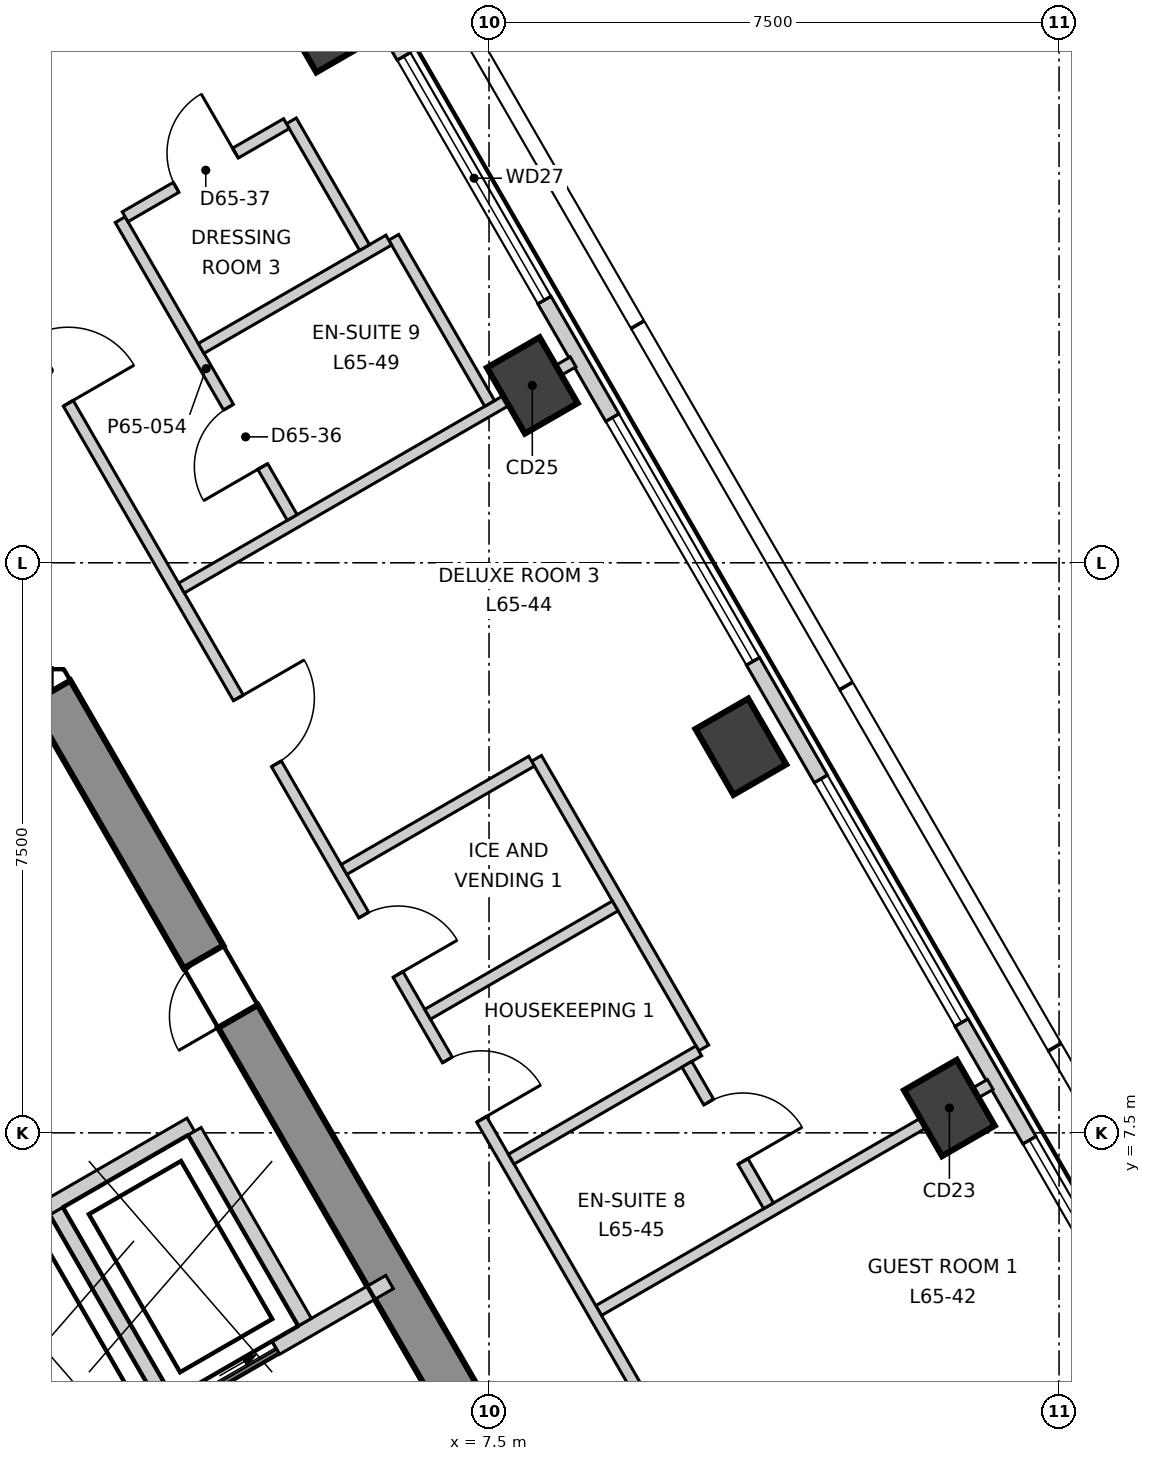
"""IFC4 building model, lengths in metres.
Left out: names, types, materials, properties, quantities, classifications, styles, units other than length and angle.
Written with IfcOpenShell. Run it as: python <this file> out.ifc"""

import sys

from ifc_helpers import new_model, si_unit, direction, frame, frame_2d, origin, origin_2d, place, context, subcontext, project, spatial, polyline, rectangle, outline, extrude, element, fill, save


model = new_model("IFC4")
c1 = context("Model", 3, precision=1e-05, world=origin(), true_north=direction((0.0, 1.0)))
c2 = subcontext(c1, "Body", "Model", "MODEL_VIEW")
j1 = project(units=[si_unit("LENGTHUNIT", "METRE"), si_unit("PLANEANGLEUNIT", "RADIAN")], contexts=[c1])
p1 = place(None, origin())
s1 = spatial("IfcSite", under=j1, at=p1, CompositionType="ELEMENT")
p2 = place(p1, origin())
s2 = spatial("IfcBuilding", under=s1, at=p2, CompositionType="ELEMENT")
p3 = place(p2, frame((0.0, 0.0, 279.1)))
s3 = spatial("IfcBuildingStorey", under=s2, at=p3, CompositionType="ELEMENT", Elevation=279.1)
p4 = place(p3, frame((1.732, 13.3, -0.3), z_axis=(0.0, 0.0, 1.0), x_axis=(-1.0, 0.0, 0.0)))
e1 = element("IfcWall", 1, at=p4, inside=s3, PredefinedType="SHEAR", context=c2, shape_type="SweptSolid", body=[
    extrude(outline(polyline([(-0.173, -0.3), (1.732, -0.3), (3.637, -0.3), (3.291, 0.3), (1.732, 0.3), (0.173, 0.3), (-0.173, -0.3)])), origin(), (0.0, 0.0, 1.0), 3.6),
])
p5 = place(p4, frame((1.032, 0.0, 0.3)))
e2 = element("IfcOpeningElement", 2, at=p5, cuts=e1, PredefinedType="OPENING", context=c2, shape_type="SweptSolid", body=[
    extrude(rectangle(XDim=1.4, YDim=2.1, at=frame_2d((0.7, 1.05))), frame((0.0, 0.31, 0.0), z_axis=(0.0, -1.0, 0.0), x_axis=(1.0, 0.0, 0.0)), (0.0, 0.0, 1.0), 0.62),
])
p6 = place(p3, frame((12.384, -5.15, -0.3), z_axis=(0.0, 0.0, 1.0), x_axis=(-0.500000539815, 0.866025092122, 0.0)))
e3 = element("IfcWall", 3, at=p6, inside=s3, PredefinedType="SHEAR", context=c2, shape_type="SweptSolid", body=[
    extrude(outline(polyline([(-0.173, -0.301), (1.795, -0.301), (3.763, -0.301), (5.731, -0.301), (7.7, -0.301), (9.668, -0.301), (11.636, -0.301), (13.604, -0.3), (15.573, -0.3), (17.541, -0.3), (19.509, -0.3), (21.477, -0.3), (21.131, 0.3), (19.226, 0.3), (17.321, 0.3), (15.415, 0.3), (13.51, 0.3), (11.605, 0.3), (9.699, 0.3), (7.794, 0.3), (5.889, 0.3), (3.984, 0.3), (2.078, 0.3), (0.173, 0.3), (-0.173, -0.301)])), origin(), (0.0, 0.0, 1.0), 3.6),
])
p7 = place(p6, frame((16.378, 0.0, 0.3)))
e4 = element("IfcOpeningElement", 4, at=p7, cuts=e3, PredefinedType="OPENING", context=c2, shape_type="SweptSolid", body=[
    extrude(rectangle(XDim=0.9, YDim=2.1, at=frame_2d((0.45, 1.05))), frame((0.0, 0.31, 0.0), z_axis=(0.0, -1.0, 0.0), x_axis=(1.0, 0.0, 0.0)), (0.0, 0.0, 1.0), 0.621),
])
p8 = place(p6, frame((3.976, 0.0, 0.3)))
e5 = element("IfcOpeningElement", 5, at=p8, cuts=e3, PredefinedType="OPENING", context=c2, shape_type="SweptSolid", body=[
    extrude(rectangle(XDim=1.0, YDim=2.1, at=frame_2d((0.5, 1.05))), frame((0.0, 0.31, 0.0), z_axis=(0.0, -1.0, 0.0), x_axis=(1.0, 0.0, 0.0)), (0.0, 0.0, 1.0), 0.621),
])
for number, where, z_axis, x_axis in (
    (6, (13.557, 7.827, -0.3), (0.0, 0.0, 1.0), (-0.5, 0.866, 0.0)),
    (7, (10.813, 12.58, -0.3), (0.0, 0.0, 1.0), (-0.5, 0.866, 0.0)),
    (8, (8.069, 17.333, -0.3), (0.0, 0.0, 1.0), (-0.5, 0.866, 0.0)),
    (9, (5.325, 22.085, -0.3), (0.0, 0.0, 1.0), (-0.5, 0.866, 0.0)),
):
    element("IfcColumn", number, at=place(p3, frame(where, z_axis=z_axis, x_axis=x_axis)), inside=s3, PredefinedType="COLUMN", context=c2, shape_type="SweptSolid", body=[
        extrude(rectangle(XDim=1.0, YDim=0.8, at=origin_2d()), origin(), (0.0, 0.0, 1.0), 3.6),
    ])
p9 = place(p3, frame((25.791, -11.962, 0.0), z_axis=(0.0, 0.0, 1.0), x_axis=(-0.500006870765, 0.86602143691, 0.0)))
e10 = element("IfcWall", 10, at=p9, inside=s3, PredefinedType="ELEMENTEDWALL", context=c2, shape_type="SweptSolid", body=[
    extrude(rectangle(XDim=46.49, YDim=0.2, at=frame_2d((23.245, 0.0))), origin(), (0.0, 0.0, 1.0), 3.3),
])
p10 = place(p9, frame((2.197, 0.0, 0.9)))
e11 = element("IfcOpeningElement", 11, at=p10, cuts=e10, PredefinedType="OPENING", context=c2, shape_type="SweptSolid", body=[
    extrude(rectangle(XDim=3.7, YDim=2.2, at=frame_2d((1.85, 1.1))), frame((0.0, 0.11, 0.0), z_axis=(0.0, -1.0, 0.0), x_axis=(1.0, 0.0, 0.0)), (0.0, 0.0, 1.0), 0.22),
])
p11 = place(p9, frame((7.685, 0.0, 0.9)))
e12 = element("IfcOpeningElement", 12, at=p11, cuts=e10, PredefinedType="OPENING", context=c2, shape_type="SweptSolid", body=[
    extrude(rectangle(XDim=3.7, YDim=2.2, at=frame_2d((1.85, 1.1))), frame((0.0, 0.11, 0.0), z_axis=(0.0, -1.0, 0.0), x_axis=(1.0, 0.0, 0.0)), (0.0, 0.0, 1.0), 0.22),
])
p12 = place(p9, frame((13.173, 0.0, 0.9)))
e13 = element("IfcOpeningElement", 13, at=p12, cuts=e10, PredefinedType="OPENING", context=c2, shape_type="SweptSolid", body=[
    extrude(rectangle(XDim=3.7, YDim=2.2, at=frame_2d((1.85, 1.1))), frame((0.0, 0.11, 0.0), z_axis=(0.0, -1.0, 0.0), x_axis=(1.0, 0.0, 0.0)), (0.0, 0.0, 1.0), 0.22),
])
p13 = place(p9, frame((18.661, 0.0, 0.9)))
e14 = element("IfcOpeningElement", 14, at=p13, cuts=e10, PredefinedType="OPENING", context=c2, shape_type="SweptSolid", body=[
    extrude(rectangle(XDim=3.7, YDim=2.2, at=frame_2d((1.85, 1.1))), frame((0.0, 0.11, 0.0), z_axis=(0.0, -1.0, 0.0), x_axis=(1.0, 0.0, 0.0)), (0.0, 0.0, 1.0), 0.22),
])
p14 = place(p9, frame((24.149, 0.0, 0.9)))
e15 = element("IfcOpeningElement", 15, at=p14, cuts=e10, PredefinedType="OPENING", context=c2, shape_type="SweptSolid", body=[
    extrude(rectangle(XDim=3.7, YDim=2.2, at=frame_2d((1.85, 1.1))), frame((0.0, 0.11, 0.0), z_axis=(0.0, -1.0, 0.0), x_axis=(1.0, 0.0, 0.0)), (0.0, 0.0, 1.0), 0.22),
])
p15 = place(p9, frame((29.637, 0.0, 0.9)))
e16 = element("IfcOpeningElement", 16, at=p15, cuts=e10, PredefinedType="OPENING", context=c2, shape_type="SweptSolid", body=[
    extrude(rectangle(XDim=3.7, YDim=2.2, at=frame_2d((1.85, 1.1))), frame((0.0, 0.11, 0.0), z_axis=(0.0, -1.0, 0.0), x_axis=(1.0, 0.0, 0.0)), (0.0, 0.0, 1.0), 0.22),
])
p16 = place(p9, frame((35.125, 0.0, 0.9)))
e17 = element("IfcOpeningElement", 17, at=p16, cuts=e10, PredefinedType="OPENING", context=c2, shape_type="SweptSolid", body=[
    extrude(rectangle(XDim=3.7, YDim=2.2, at=frame_2d((1.85, 1.1))), frame((0.0, 0.11, 0.0), z_axis=(0.0, -1.0, 0.0), x_axis=(1.0, 0.0, 0.0)), (0.0, 0.0, 1.0), 0.22),
])
p17 = place(p9, frame((40.613, 0.0, 0.9)))
e18 = element("IfcOpeningElement", 18, at=p17, cuts=e10, PredefinedType="OPENING", context=c2, shape_type="SweptSolid", body=[
    extrude(rectangle(XDim=3.7, YDim=2.2, at=frame_2d((1.85, 1.1))), frame((0.0, 0.11, 0.0), z_axis=(0.0, -1.0, 0.0), x_axis=(1.0, 0.0, 0.0)), (0.0, 0.0, 1.0), 0.22),
])
p18 = place(p3, frame((8.942, 5.162, 0.0), z_axis=(0.0, 0.0, 1.0), x_axis=(0.866004483474, 0.50003623329, 0.0)))
e19 = element("IfcWall", 19, at=p18, inside=s3, PredefinedType="PARTITIONING", context=c2, shape_type="SweptSolid", body=[
    extrude(rectangle(XDim=5.949, YDim=0.15, at=frame_2d((2.975, 0.0))), origin(), (0.0, 0.0, 1.0), 2.8),
])
p19 = place(p3, frame((0.075, 20.37, 0.0), z_axis=(0.0, 0.0, 1.0), x_axis=(0.500003985697, -0.866023102629, 0.0)))
e20 = element("IfcWall", 20, at=p19, inside=s3, PredefinedType="PARTITIONING", context=c2, shape_type="SweptSolid", body=[
    extrude(rectangle(XDim=35.206, YDim=0.15, at=frame_2d((17.603, 0.0))), origin(), (0.0, 0.0, 1.0), 3.3),
])
p20 = place(p19, frame((31.506, 0.0, 0.0)))
e21 = element("IfcOpeningElement", 21, at=p20, cuts=e20, PredefinedType="OPENING", context=c2, shape_type="SweptSolid", body=[
    extrude(rectangle(XDim=1.0, YDim=2.1, at=frame_2d((0.5, 1.05))), frame((0.0, 0.085, 0.0), z_axis=(0.0, -1.0, 0.0), x_axis=(1.0, 0.0, 0.0)), (0.0, 0.0, 1.0), 0.17),
])
p21 = place(p19, frame((26.529, 0.0, 0.0)))
e22 = element("IfcOpeningElement", 22, at=p21, cuts=e20, PredefinedType="OPENING", context=c2, shape_type="SweptSolid", body=[
    extrude(rectangle(XDim=1.0, YDim=2.1, at=frame_2d((0.5, 1.05))), frame((0.0, 0.085, 0.0), z_axis=(0.0, -1.0, 0.0), x_axis=(1.0, 0.0, 0.0)), (0.0, 0.0, 1.0), 0.17),
])
p22 = place(p19, frame((19.442, 0.0, 0.0)))
e23 = element("IfcOpeningElement", 23, at=p22, cuts=e20, PredefinedType="OPENING", context=c2, shape_type="SweptSolid", body=[
    extrude(rectangle(XDim=1.0, YDim=2.1, at=frame_2d((0.5, 1.05))), frame((0.0, 0.085, 0.0), z_axis=(0.0, -1.0, 0.0), x_axis=(1.0, 0.0, 0.0)), (0.0, 0.0, 1.0), 0.17),
])
p23 = place(p19, frame((8.254, 0.0, 0.0)))
e24 = element("IfcOpeningElement", 24, at=p23, cuts=e20, PredefinedType="OPENING", context=c2, shape_type="SweptSolid", body=[
    extrude(rectangle(XDim=1.0, YDim=2.1, at=frame_2d((0.5, 1.05))), frame((0.0, 0.085, 0.0), z_axis=(0.0, -1.0, 0.0), x_axis=(1.0, 0.0, 0.0)), (0.0, 0.0, 1.0), 0.17),
])
p24 = place(p19, frame((13.754, 0.0, 0.0)))
e25 = element("IfcOpeningElement", 25, at=p24, cuts=e20, PredefinedType="OPENING", context=c2, shape_type="SweptSolid", body=[
    extrude(rectangle(XDim=0.9, YDim=2.1, at=frame_2d((0.45, 1.05))), frame((0.0, 0.085, 0.0), z_axis=(0.0, -1.0, 0.0), x_axis=(1.0, 0.0, 0.0)), (0.0, 0.0, 1.0), 0.17),
])
p25 = place(p19, frame((11.554, 0.0, 0.0)))
e26 = element("IfcOpeningElement", 26, at=p25, cuts=e20, PredefinedType="OPENING", context=c2, shape_type="SweptSolid", body=[
    extrude(rectangle(XDim=0.9, YDim=2.1, at=frame_2d((0.45, 1.05))), frame((0.0, 0.085, 0.0), z_axis=(0.0, -1.0, 0.0), x_axis=(1.0, 0.0, 0.0)), (0.0, 0.0, 1.0), 0.17),
])
p26 = place(p19, frame((2.777, 0.0, 0.0)))
e27 = element("IfcOpeningElement", 27, at=p26, cuts=e20, PredefinedType="OPENING", context=c2, shape_type="SweptSolid", body=[
    extrude(rectangle(XDim=1.0, YDim=2.1, at=frame_2d((0.5, 1.05))), frame((0.0, 0.085, 0.0), z_axis=(0.0, -1.0, 0.0), x_axis=(1.0, 0.0, 0.0)), (0.0, 0.0, 1.0), 0.17),
])
p27 = place(p3, frame((3.454, 14.668, 0.0), z_axis=(0.0, 0.0, 1.0), x_axis=(0.865976450533, 0.500084779935, 0.0)))
e28 = element("IfcWall", 28, at=p27, inside=s3, PredefinedType="PARTITIONING", context=c2, shape_type="SweptSolid", body=[
    extrude(rectangle(XDim=5.949, YDim=0.15, at=frame_2d((2.975, 0.0))), origin(), (0.0, 0.0, 1.0), 3.3),
])
p28 = place(p3, frame((8.125, 12.427, 0.0), z_axis=(0.0, 0.0, 1.0), x_axis=(0.500036278648, -0.866004457284, 0.0)))
e29 = element("IfcWall", 29, at=p28, inside=s3, PredefinedType="PARTITIONING", context=c2, shape_type="SweptSolid", body=[
    extrude(rectangle(XDim=4.4, YDim=0.15, at=frame_2d((2.2, 0.0))), origin(), (0.0, 0.0, 1.0), 3.3),
])
for number, where, z_axis, x_axis in (
    (30, (5.592, 10.965, 0.0), (0.0, 0.0, 1.0), (0.866, 0.5, 0.0)),
    (31, (6.692, 9.06, 0.0), (0.0, 0.0, 1.0), (0.866, 0.5, 0.0)),
    (32, (7.792, 7.154, 0.0), (0.0, 0.0, 1.0), (0.866, 0.5, 0.0)),
):
    element("IfcWall", number, at=place(p3, frame(where, z_axis=z_axis, x_axis=x_axis)), inside=s3, PredefinedType="PARTITIONING", context=c2, shape_type="SweptSolid", body=[
        extrude(rectangle(XDim=2.85, YDim=0.15, at=frame_2d((1.425, 0.0))), origin(), (0.0, 0.0, 1.0), 3.3),
    ])
p29 = place(p3, frame((2.647, 19.514, 0.0), z_axis=(0.0, 0.0, 1.0), x_axis=(0.500149036902, -0.865939340188, 0.0)))
e33 = element("IfcWall", 33, at=p29, inside=s3, PredefinedType="PARTITIONING", context=c2, shape_type="SweptSolid", body=[
    extrude(rectangle(XDim=4.524, YDim=0.15, at=frame_2d((2.262, 0.0))), origin(), (0.0, 0.0, 1.0), 3.3),
])
p30 = place(p29, frame((2.85, 0.0, 0.0)))
e34 = element("IfcOpeningElement", 34, at=p30, cuts=e33, PredefinedType="OPENING", context=c2, shape_type="SweptSolid", body=[
    extrude(rectangle(XDim=0.9, YDim=2.1, at=frame_2d((0.45, 1.05))), frame((0.0, 0.085, 0.0), z_axis=(0.0, -1.0, 0.0), x_axis=(1.0, 0.0, 0.0)), (0.0, 0.0, 1.0), 0.17),
])
p31 = place(p3, frame((6.246, 19.282, 0.0), z_axis=(0.0, 0.0, 1.0), x_axis=(0.499956887143, -0.866050293573, 0.0)))
e35 = element("IfcWall", 35, at=p31, inside=s3, PredefinedType="PARTITIONING", context=c2, shape_type="SweptSolid", body=[
    extrude(rectangle(XDim=2.524, YDim=0.15, at=frame_2d((1.262, 0.0))), origin(), (0.0, 0.0, 1.0), 3.3),
])
p32 = place(p3, frame((3.712, 17.82, 0.0), z_axis=(0.0, 0.0, 1.0), x_axis=(0.866090043625, 0.499888023795, 0.0)))
e36 = element("IfcWall", 36, at=p32, inside=s3, PredefinedType="PARTITIONING", context=c2, shape_type="SweptSolid", body=[
    extrude(rectangle(XDim=2.851, YDim=0.15, at=frame_2d((1.425, 0.0))), origin(), (0.0, 0.0, 1.0), 3.3),
])
p33 = place(p3, frame((4.899, 20.814, 0.0), z_axis=(0.0, 0.0, 1.0), x_axis=(0.500271259635, -0.865868735308, 0.0)))
e37 = element("IfcWall", 37, at=p33, inside=s3, PredefinedType="PARTITIONING", context=c2, shape_type="SweptSolid", body=[
    extrude(rectangle(XDim=1.925, YDim=0.15, at=frame_2d((0.963, 0.0))), origin(), (0.0, 0.0, 1.0), 3.3),
])
p34 = place(p3, frame((2.712, 19.552, 0.0), z_axis=(0.0, 0.0, 1.0), x_axis=(0.8660395779, 0.499975448907, 0.0)))
e38 = element("IfcWall", 38, at=p34, inside=s3, PredefinedType="PARTITIONING", context=c2, shape_type="SweptSolid", body=[
    extrude(rectangle(XDim=2.45, YDim=0.15, at=frame_2d((1.225, 0.0))), origin(), (0.0, 0.0, 1.0), 3.3),
])
p35 = place(p34, frame((0.775, 0.0, 0.0)))
e39 = element("IfcOpeningElement", 39, at=p35, cuts=e38, PredefinedType="OPENING", context=c2, shape_type="SweptSolid", body=[
    extrude(rectangle(XDim=0.9, YDim=2.1, at=frame_2d((0.45, 1.05))), frame((0.0, 0.085, 0.0), z_axis=(0.0, -1.0, 0.0), x_axis=(1.0, 0.0, 0.0)), (0.0, 0.0, 1.0), 0.17),
])
p36 = place(p3, frame((10.103, 8.402, 0.0), z_axis=(0.0, 0.0, 1.0), x_axis=(0.499961633463, -0.866047553582, 0.0)))
e40 = element("IfcWall", 40, at=p36, inside=s3, PredefinedType="PARTITIONING", context=c2, shape_type="SweptSolid", body=[
    extrude(rectangle(XDim=2.15, YDim=0.15, at=frame_2d((1.075, 0.0))), origin(), (0.0, 0.0, 1.0), 3.3),
])
p37 = place(p36, frame((0.575, 0.0, 0.0)))
e41 = element("IfcOpeningElement", 41, at=p37, cuts=e40, PredefinedType="OPENING", context=c2, shape_type="SweptSolid", body=[
    extrude(rectangle(XDim=0.9, YDim=2.1, at=frame_2d((0.45, 1.05))), frame((0.0, 0.085, 0.0), z_axis=(0.0, -1.0, 0.0), x_axis=(1.0, 0.0, 0.0)), (0.0, 0.0, 1.0), 0.17),
])
p38 = place(p3, frame((-0.002, 5.541, 0.0), z_axis=(0.0, 0.0, 1.0), x_axis=(0.86600155993, 0.500041296494, 0.0)))
e42 = element("IfcWall", 42, at=p38, inside=s3, PredefinedType="SOLIDWALL", context=c2, shape_type="SweptSolid", body=[
    extrude(rectangle(XDim=4.132, YDim=0.2, at=frame_2d((2.066, 0.0))), origin(), (0.0, 0.0, 1.0), 3.3),
])
p39 = place(p3, frame((1.578, 2.874, 0.0), z_axis=(0.0, 0.0, 1.0), x_axis=(0.866045911672, 0.499964477614, 0.0)))
e43 = element("IfcWall", 43, at=p39, inside=s3, PredefinedType="SOLIDWALL", context=c2, shape_type="SweptSolid", body=[
    extrude(rectangle(XDim=5.327, YDim=0.2, at=frame_2d((2.663, 0.0))), origin(), (0.0, 0.0, 1.0), 3.3),
])
p40 = place(p39, frame((2.496, 0.0, 0.0)))
e44 = element("IfcOpeningElement", 44, at=p40, cuts=e43, PredefinedType="OPENING", context=c2, shape_type="SweptSolid", body=[
    extrude(rectangle(XDim=1.1, YDim=2.1, at=frame_2d((0.55, 1.05))), frame((0.0, 0.11, 0.0), z_axis=(0.0, -1.0, 0.0), x_axis=(1.0, 0.0, 0.0)), (0.0, 0.0, 1.0), 0.22),
])
for number, where, z_axis, x_axis in (
    (45, (3.626, 7.52, 0.0), (0.0, 0.0, 1.0), (0.5, -0.866, 0.0)),
    (46, (1.807, 6.47, 0.0), (0.0, 0.0, 1.0), (0.5, -0.866, 0.0)),
):
    element("IfcWall", number, at=place(p3, frame(where, z_axis=z_axis, x_axis=x_axis)), inside=s3, PredefinedType="SOLIDWALL", context=c2, shape_type="SweptSolid", body=[
        extrude(rectangle(XDim=2.9, YDim=0.2, at=frame_2d((1.45, 0.0))), origin(), (0.0, 0.0, 1.0), 3.3),
    ])
p41 = place(p13, origin())
e47 = element("IfcWindow", 47, at=p41, inside=s3, PartitioningType="SINGLE_PANEL", PredefinedType="WINDOW", context=c2, shape_type="SweptSolid", body=[
    extrude(rectangle(XDim=3.7, YDim=2.2, at=frame_2d((1.85, 1.1))), frame((0.0, 0.03, 0.0), z_axis=(0.0, -1.0, 0.0), x_axis=(1.0, 0.0, 0.0)), (0.0, 0.0, 1.0), 0.06),
])
fill(e14, e47)
p42 = place(p14, origin())
e48 = element("IfcWindow", 48, at=p42, inside=s3, PartitioningType="SINGLE_PANEL", PredefinedType="WINDOW", context=c2, shape_type="SweptSolid", body=[
    extrude(rectangle(XDim=3.7, YDim=2.2, at=frame_2d((1.85, 1.1))), frame((0.0, 0.03, 0.0), z_axis=(0.0, -1.0, 0.0), x_axis=(1.0, 0.0, 0.0)), (0.0, 0.0, 1.0), 0.06),
])
fill(e15, e48)
p43 = place(p15, origin())
e49 = element("IfcWindow", 49, at=p43, inside=s3, PartitioningType="SINGLE_PANEL", PredefinedType="WINDOW", context=c2, shape_type="SweptSolid", body=[
    extrude(rectangle(XDim=3.7, YDim=2.2, at=frame_2d((1.85, 1.1))), frame((0.0, 0.03, 0.0), z_axis=(0.0, -1.0, 0.0), x_axis=(1.0, 0.0, 0.0)), (0.0, 0.0, 1.0), 0.06),
])
fill(e16, e49)
p44 = place(p16, origin())
e50 = element("IfcWindow", 50, at=p44, inside=s3, PartitioningType="SINGLE_PANEL", PredefinedType="WINDOW", context=c2, shape_type="SweptSolid", body=[
    extrude(rectangle(XDim=3.7, YDim=2.2, at=frame_2d((1.85, 1.1))), frame((0.0, 0.03, 0.0), z_axis=(0.0, -1.0, 0.0), x_axis=(1.0, 0.0, 0.0)), (0.0, 0.0, 1.0), 0.06),
])
fill(e17, e50)
p45 = place(p40, origin())
e51 = element("IfcDoor", 51, at=p45, inside=s3, OperationType="SLIDING_TO_LEFT", PredefinedType="DOOR", context=c2, shape_type="SweptSolid", body=[
    extrude(rectangle(XDim=1.1, YDim=2.1, at=frame_2d((0.55, 1.05))), frame((0.0, 0.025, 0.0), z_axis=(0.0, -1.0, 0.0), x_axis=(1.0, 0.0, 0.0)), (0.0, 0.0, 1.0), 0.05),
])
fill(e44, e51)
p46 = place(p23, origin())
e52 = element("IfcDoor", 52, at=p46, inside=s3, OperationType="SINGLE_SWING_RIGHT", PredefinedType="DOOR", context=c2, shape_type="SweptSolid", body=[
    extrude(rectangle(XDim=1.0, YDim=2.1, at=frame_2d((0.5, 1.05))), frame((0.0, 0.025, 0.0), z_axis=(0.0, -1.0, 0.0), x_axis=(1.0, 0.0, 0.0)), (0.0, 0.0, 1.0), 0.05),
])
fill(e24, e52)
p47 = place(p37, origin())
e53 = element("IfcDoor", 53, at=p47, inside=s3, OperationType="SINGLE_SWING_LEFT", PredefinedType="DOOR", context=c2, shape_type="SweptSolid", body=[
    extrude(rectangle(XDim=0.9, YDim=2.1, at=frame_2d((0.45, 1.05))), frame((0.0, 0.025, 0.0), z_axis=(0.0, -1.0, 0.0), x_axis=(1.0, 0.0, 0.0)), (0.0, 0.0, 1.0), 0.05),
])
fill(e41, e53)
p48 = place(p24, origin())
e54 = element("IfcDoor", 54, at=p48, inside=s3, OperationType="SINGLE_SWING_LEFT", PredefinedType="DOOR", context=c2, shape_type="SweptSolid", body=[
    extrude(rectangle(XDim=0.9, YDim=2.1, at=frame_2d((0.45, 1.05))), frame((0.0, 0.025, 0.0), z_axis=(0.0, -1.0, 0.0), x_axis=(1.0, 0.0, 0.0)), (0.0, 0.0, 1.0), 0.05),
])
fill(e25, e54)
p49 = place(p25, origin())
e55 = element("IfcDoor", 55, at=p49, inside=s3, OperationType="SINGLE_SWING_LEFT", PredefinedType="DOOR", context=c2, shape_type="SweptSolid", body=[
    extrude(rectangle(XDim=0.9, YDim=2.1, at=frame_2d((0.45, 1.05))), frame((0.0, 0.025, 0.0), z_axis=(0.0, -1.0, 0.0), x_axis=(1.0, 0.0, 0.0)), (0.0, 0.0, 1.0), 0.05),
])
fill(e26, e55)
p50 = place(p26, origin())
e56 = element("IfcDoor", 56, at=p50, inside=s3, OperationType="SINGLE_SWING_LEFT", PredefinedType="DOOR", context=c2, shape_type="SweptSolid", body=[
    extrude(rectangle(XDim=1.0, YDim=2.1, at=frame_2d((0.5, 1.05))), frame((0.0, 0.025, 0.0), z_axis=(0.0, -1.0, 0.0), x_axis=(1.0, 0.0, 0.0)), (0.0, 0.0, 1.0), 0.05),
])
fill(e27, e56)
p51 = place(p30, origin())
e57 = element("IfcDoor", 57, at=p51, inside=s3, OperationType="SINGLE_SWING_RIGHT", PredefinedType="DOOR", context=c2, shape_type="SweptSolid", body=[
    extrude(rectangle(XDim=0.9, YDim=2.1, at=frame_2d((0.45, 1.05))), frame((0.0, 0.025, 0.0), z_axis=(0.0, -1.0, 0.0), x_axis=(1.0, 0.0, 0.0)), (0.0, 0.0, 1.0), 0.05),
])
fill(e34, e57)
p52 = place(p35, origin())
e58 = element("IfcDoor", 58, at=p52, inside=s3, OperationType="SINGLE_SWING_LEFT", PredefinedType="DOOR", context=c2, shape_type="SweptSolid", body=[
    extrude(rectangle(XDim=0.9, YDim=2.1, at=frame_2d((0.45, 1.05))), frame((0.0, 0.025, 0.0), z_axis=(0.0, -1.0, 0.0), x_axis=(1.0, 0.0, 0.0)), (0.0, 0.0, 1.0), 0.05),
])
fill(e39, e58)
p53 = place(p7, origin())
e59 = element("IfcDoor", 59, at=p53, inside=s3, OperationType="SINGLE_SWING_RIGHT", PredefinedType="DOOR", context=c2, shape_type="SweptSolid", body=[
    extrude(rectangle(XDim=0.9, YDim=2.1, at=frame_2d((0.45, 1.05))), frame((0.0, 0.025, 0.0), z_axis=(0.0, -1.0, 0.0), x_axis=(1.0, 0.0, 0.0)), (0.0, 0.0, 1.0), 0.05),
])
fill(e4, e59)
save(model, sys.argv[1])
